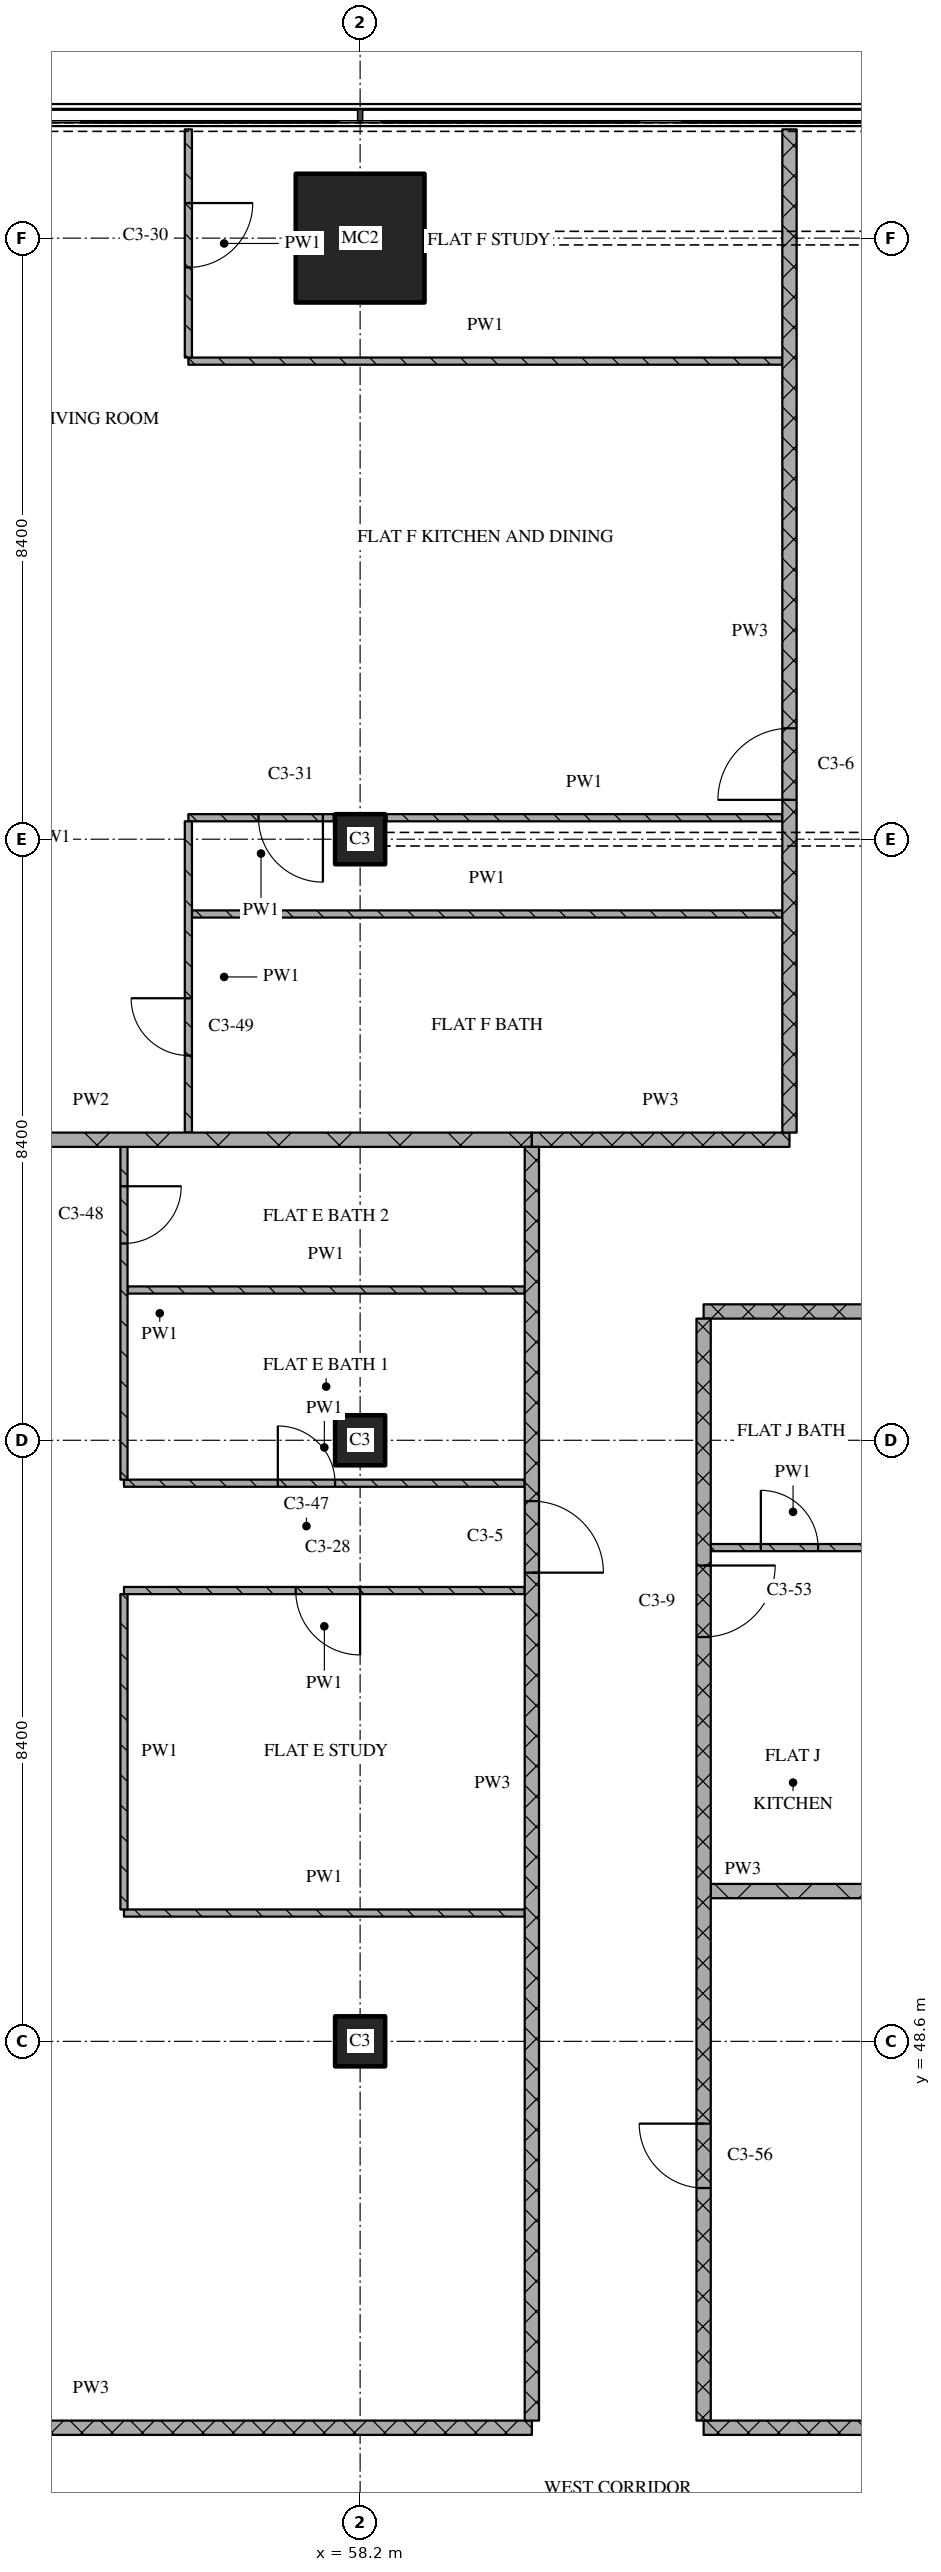
"""IFC4 building model, lengths in metres.
Left out: names, types, materials, properties, quantities, classifications, styles, units other than length and angle.
Written with IfcOpenShell. Run it as: python <this file> out.ifc"""

import sys

from ifc_helpers import new_model, si_unit, direction, frame, frame_2d, origin, origin_2d, place, context, subcontext, project, spatial, rectangle, extrude, element, fill, save


model = new_model("IFC4")
c1 = context("Model", 3, precision=1e-05, world=origin(), true_north=direction((0.0, 1.0)))
c2 = subcontext(c1, "Body", "Model", "MODEL_VIEW")
j1 = project(units=[si_unit("LENGTHUNIT", "METRE"), si_unit("PLANEANGLEUNIT", "RADIAN")], contexts=[c1])
p1 = place(None, origin())
s1 = spatial("IfcSite", under=j1, at=p1, CompositionType="ELEMENT")
p2 = place(p1, origin())
s2 = spatial("IfcBuilding", under=s1, at=p2, CompositionType="ELEMENT")
p3 = place(p2, frame((0.0, 0.0, 176.25)))
s3 = spatial("IfcBuildingStorey", under=s2, at=p3, CompositionType="ELEMENT", Elevation=176.25)
for number, where, z_axis, x_axis in (
    (1, (58.2, 48.6, 0.0), (0.0, 0.0, 1.0), (1.0, 0.0, 0.0)),
    (2, (58.2, 57.0, 0.0), (0.0, 0.0, 1.0), (1.0, 0.0, 0.0)),
    (3, (58.2, 65.4, 0.0), (0.0, 0.0, 1.0), (1.0, 0.0, 0.0)),
):
    element("IfcColumn", number, at=place(p3, frame(where, z_axis=z_axis, x_axis=x_axis)), inside=s3, PredefinedType="COLUMN", context=c2, shape_type="SweptSolid", body=[
        extrude(rectangle(XDim=0.7, YDim=0.7, at=origin_2d()), origin(), (0.0, 0.0, 1.0), 3.6),
    ])
p4 = place(p3, frame((58.2, 73.8, 0.0), z_axis=(0.0, 0.0, 1.0), x_axis=(1.0, 0.0, 0.0)))
e4 = element("IfcColumn", 4, at=p4, inside=s3, PredefinedType="COLUMN", context=c2, shape_type="SweptSolid", body=[
    extrude(rectangle(XDim=1.8, YDim=1.8, at=origin_2d()), origin(), (0.0, 0.0, 1.0), 3.6),
])
p5 = place(p3, frame((48.28, 43.2, 0.0), z_axis=(0.0, 0.0, 1.0), x_axis=(1.0, 0.0, 0.0)))
e5 = element("IfcWall", 5, at=p5, inside=s3, PredefinedType="PARTITIONING", context=c2, shape_type="SweptSolid", body=[
    extrude(rectangle(XDim=12.32, YDim=0.2, at=frame_2d((6.16, 0.0))), origin(), (0.0, 0.0, 1.0), 3.32),
])
p6 = place(p3, frame((63.0, 43.2, 0.0), z_axis=(0.0, 0.0, 1.0), x_axis=(1.0, 0.0, 0.0)))
e6 = element("IfcWall", 6, at=p6, inside=s3, PredefinedType="PARTITIONING", context=c2, shape_type="SweptSolid", body=[
    extrude(rectangle(XDim=5.2, YDim=0.2, at=frame_2d((2.6, 0.0))), origin(), (0.0, 0.0, 1.0), 3.32),
])
p7 = place(p3, frame((54.9, 50.393, 0.0), z_axis=(0.0, 0.0, 1.0), x_axis=(1.0, 0.0, 0.0)))
e7 = element("IfcWall", 7, at=p7, inside=s3, PredefinedType="PARTITIONING", context=c2, shape_type="SweptSolid", body=[
    extrude(rectangle(XDim=5.6, YDim=0.1, at=frame_2d((2.8, 0.0))), origin(), (0.0, 0.0, 1.0), 3.32),
])
p8 = place(p3, frame((63.1, 50.7, 0.0), z_axis=(0.0, 0.0, 1.0), x_axis=(1.0, 0.0, 0.0)))
e8 = element("IfcWall", 8, at=p8, inside=s3, PredefinedType="PARTITIONING", context=c2, shape_type="SweptSolid", body=[
    extrude(rectangle(XDim=5.1, YDim=0.2, at=frame_2d((2.55, 0.0))), origin(), (0.0, 0.0, 1.0), 3.32),
])
p9 = place(p3, frame((60.5, 54.9, 0.0), z_axis=(0.0, 0.0, 1.0), x_axis=(-1.0, 0.0, 0.0)))
e9 = element("IfcWall", 9, at=p9, inside=s3, PredefinedType="PARTITIONING", context=c2, shape_type="SweptSolid", body=[
    extrude(rectangle(XDim=5.6, YDim=0.1, at=frame_2d((2.8, 0.0))), origin(), (0.0, 0.0, 1.0), 3.32),
])
p10 = place(p9, frame((2.3, 0.0, 0.0)))
e10 = element("IfcOpeningElement", 10, at=p10, cuts=e9, PredefinedType="OPENING", context=c2, shape_type="SweptSolid", body=[
    extrude(rectangle(XDim=0.9, YDim=2.1, at=frame_2d((0.45, 1.05))), frame((0.0, 0.06, 0.0), z_axis=(0.0, -1.0, 0.0), x_axis=(1.0, 0.0, 0.0)), (0.0, 0.0, 1.0), 0.12),
])
p11 = place(p3, frame((63.1, 55.5, 0.0), z_axis=(0.0, 0.0, 1.0), x_axis=(1.0, 0.0, 0.0)))
e11 = element("IfcWall", 11, at=p11, inside=s3, PredefinedType="PARTITIONING", context=c2, shape_type="SweptSolid", body=[
    extrude(rectangle(XDim=2.3, YDim=0.1, at=frame_2d((1.15, 0.0))), origin(), (0.0, 0.0, 1.0), 3.32),
])
p12 = place(p11, frame((0.7, 0.0, 0.0)))
e12 = element("IfcOpeningElement", 12, at=p12, cuts=e11, PredefinedType="OPENING", context=c2, shape_type="SweptSolid", body=[
    extrude(rectangle(XDim=0.8, YDim=2.1, at=frame_2d((0.4, 1.05))), frame((0.0, 0.06, 0.0), z_axis=(0.0, -1.0, 0.0), x_axis=(1.0, 0.0, 0.0)), (0.0, 0.0, 1.0), 0.12),
])
p13 = place(p3, frame((54.9, 56.4, 0.0), z_axis=(0.0, 0.0, 1.0), x_axis=(1.0, 0.0, 0.0)))
e13 = element("IfcWall", 13, at=p13, inside=s3, PredefinedType="PARTITIONING", context=c2, shape_type="SweptSolid", body=[
    extrude(rectangle(XDim=5.6, YDim=0.1, at=frame_2d((2.8, 0.0))), origin(), (0.0, 0.0, 1.0), 3.32),
])
p14 = place(p13, frame((2.15, 0.0, 0.0)))
e14 = element("IfcOpeningElement", 14, at=p14, cuts=e13, PredefinedType="OPENING", context=c2, shape_type="SweptSolid", body=[
    extrude(rectangle(XDim=0.8, YDim=2.1, at=frame_2d((0.4, 1.05))), frame((0.0, 0.06, 0.0), z_axis=(0.0, -1.0, 0.0), x_axis=(1.0, 0.0, 0.0)), (0.0, 0.0, 1.0), 0.12),
])
p15 = place(p3, frame((63.0, 58.8, 0.0), z_axis=(0.0, 0.0, 1.0), x_axis=(1.0, 0.0, 0.0)))
e15 = element("IfcWall", 15, at=p15, inside=s3, PredefinedType="PARTITIONING", context=c2, shape_type="SweptSolid", body=[
    extrude(rectangle(XDim=10.8, YDim=0.2, at=frame_2d((5.4, 0.0))), origin(), (0.0, 0.0, 1.0), 3.32),
])
p16 = place(p3, frame((54.95, 59.1, 0.0), z_axis=(0.0, 0.0, 1.0), x_axis=(1.0, 0.0, 0.0)))
e16 = element("IfcWall", 16, at=p16, inside=s3, PredefinedType="PARTITIONING", context=c2, shape_type="SweptSolid", body=[
    extrude(rectangle(XDim=5.55, YDim=0.1, at=frame_2d((2.775, 0.0))), origin(), (0.0, 0.0, 1.0), 3.32),
])
p17 = place(p3, frame((60.6, 61.2, 0.0), z_axis=(0.0, 0.0, 1.0), x_axis=(1.0, 0.0, 0.0)))
e17 = element("IfcWall", 17, at=p17, inside=s3, PredefinedType="PARTITIONING", context=c2, shape_type="SweptSolid", body=[
    extrude(rectangle(XDim=3.6, YDim=0.2, at=frame_2d((1.8, 0.0))), origin(), (0.0, 0.0, 1.0), 3.32),
])
p18 = place(p3, frame((48.28, 61.2, 0.0), z_axis=(0.0, 0.0, 1.0), x_axis=(1.0, 0.0, 0.0)))
e18 = element("IfcWall", 18, at=p18, inside=s3, PredefinedType="PARTITIONING", context=c2, shape_type="SweptSolid", body=[
    extrude(rectangle(XDim=12.32, YDim=0.2, at=frame_2d((6.16, 0.0))), origin(), (0.0, 0.0, 1.0), 3.32),
])
p19 = place(p3, frame((55.85, 64.355, 0.0), z_axis=(0.0, 0.0, 1.0), x_axis=(1.0, 0.0, 0.0)))
e19 = element("IfcWall", 19, at=p19, inside=s3, PredefinedType="PARTITIONING", context=c2, shape_type="SweptSolid", body=[
    extrude(rectangle(XDim=8.25, YDim=0.1, at=frame_2d((4.125, 0.0))), origin(), (0.0, 0.0, 1.0), 3.32),
])
p20 = place(p3, frame((57.83, 65.7, 0.0), z_axis=(0.0, 0.0, 1.0), x_axis=(-1.0, 0.0, 0.0)))
e20 = element("IfcWall", 20, at=p20, inside=s3, PredefinedType="PARTITIONING", context=c2, shape_type="SweptSolid", body=[
    extrude(rectangle(XDim=2.03, YDim=0.1, at=frame_2d((1.015, 0.0))), origin(), (0.0, 0.0, 1.0), 3.32),
])
p21 = place(p20, frame((0.15, 0.0, 0.0)))
e21 = element("IfcOpeningElement", 21, at=p21, cuts=e20, PredefinedType="OPENING", context=c2, shape_type="SweptSolid", body=[
    extrude(rectangle(XDim=0.9, YDim=2.1, at=frame_2d((0.45, 1.05))), frame((0.0, 0.06, 0.0), z_axis=(0.0, -1.0, 0.0), x_axis=(1.0, 0.0, 0.0)), (0.0, 0.0, 1.0), 0.12),
])
p22 = place(p3, frame((58.57, 65.7, 0.0), z_axis=(0.0, 0.0, 1.0), x_axis=(1.0, 0.0, 0.0)))
e22 = element("IfcWall", 22, at=p22, inside=s3, PredefinedType="PARTITIONING", context=c2, shape_type="SweptSolid", body=[
    extrude(rectangle(XDim=5.53, YDim=0.1, at=frame_2d((2.765, 0.0))), origin(), (0.0, 0.0, 1.0), 3.32),
])
p23 = place(p3, frame((55.8, 72.081, 0.0), z_axis=(0.0, 0.0, 1.0), x_axis=(1.0, 0.0, 0.0)))
e23 = element("IfcWall", 23, at=p23, inside=s3, PredefinedType="PARTITIONING", context=c2, shape_type="SweptSolid", body=[
    extrude(rectangle(XDim=8.3, YDim=0.1, at=frame_2d((4.15, 0.0))), origin(), (0.0, 0.0, 1.0), 3.32),
])
p24 = place(p3, frame((54.9, 54.85, 0.0), z_axis=(0.0, 0.0, 1.0), x_axis=(0.0, -1.0, 0.0)))
e24 = element("IfcWall", 24, at=p24, inside=s3, PredefinedType="PARTITIONING", context=c2, shape_type="SweptSolid", body=[
    extrude(rectangle(XDim=4.407, YDim=0.1, at=frame_2d((2.204, 0.0))), origin(), (0.0, 0.0, 1.0), 3.32),
])
p25 = place(p3, frame((54.9, 61.1, 0.0), z_axis=(0.0, 0.0, 1.0), x_axis=(0.0, -1.0, 0.0)))
e25 = element("IfcWall", 25, at=p25, inside=s3, PredefinedType="PARTITIONING", context=c2, shape_type="SweptSolid", body=[
    extrude(rectangle(XDim=4.65, YDim=0.1, at=frame_2d((2.325, 0.0))), origin(), (0.0, 0.0, 1.0), 3.32),
])
p26 = place(p25, frame((0.55, 0.0, 0.0)))
e26 = element("IfcOpeningElement", 26, at=p26, cuts=e25, PredefinedType="OPENING", context=c2, shape_type="SweptSolid", body=[
    extrude(rectangle(XDim=0.8, YDim=2.1, at=frame_2d((0.4, 1.05))), frame((0.0, 0.06, 0.0), z_axis=(0.0, -1.0, 0.0), x_axis=(1.0, 0.0, 0.0)), (0.0, 0.0, 1.0), 0.12),
])
p27 = place(p3, frame((55.8, 65.65, 0.0), z_axis=(0.0, 0.0, 1.0), x_axis=(0.0, -1.0, 0.0)))
e27 = element("IfcWall", 27, at=p27, inside=s3, PredefinedType="PARTITIONING", context=c2, shape_type="SweptSolid", body=[
    extrude(rectangle(XDim=4.35, YDim=0.1, at=frame_2d((2.175, 0.0))), origin(), (0.0, 0.0, 1.0), 3.32),
])
p28 = place(p27, frame((2.473, 0.0, 0.0)))
e28 = element("IfcOpeningElement", 28, at=p28, cuts=e27, PredefinedType="OPENING", context=c2, shape_type="SweptSolid", body=[
    extrude(rectangle(XDim=0.8, YDim=2.1, at=frame_2d((0.4, 1.05))), frame((0.0, 0.06, 0.0), z_axis=(0.0, -1.0, 0.0), x_axis=(1.0, 0.0, 0.0)), (0.0, 0.0, 1.0), 0.12),
])
p29 = place(p3, frame((55.8, 75.32, 0.0), z_axis=(0.0, 0.0, 1.0), x_axis=(0.0, -1.0, 0.0)))
e29 = element("IfcWall", 29, at=p29, inside=s3, PredefinedType="PARTITIONING", context=c2, shape_type="SweptSolid", body=[
    extrude(rectangle(XDim=3.189, YDim=0.1, at=frame_2d((1.594, 0.0))), origin(), (0.0, 0.0, 1.0), 3.32),
])
p30 = place(p29, frame((1.03, 0.0, 0.0)))
e30 = element("IfcOpeningElement", 30, at=p30, cuts=e29, PredefinedType="OPENING", context=c2, shape_type="SweptSolid", body=[
    extrude(rectangle(XDim=0.9, YDim=2.1, at=frame_2d((0.45, 1.05))), frame((0.0, 0.06, 0.0), z_axis=(0.0, -1.0, 0.0), x_axis=(1.0, 0.0, 0.0)), (0.0, 0.0, 1.0), 0.12),
])
p31 = place(p3, frame((60.6, 43.3, 0.0), z_axis=(0.0, 0.0, 1.0), x_axis=(0.0, 1.0, 0.0)))
e31 = element("IfcWall", 31, at=p31, inside=s3, PredefinedType="PARTITIONING", context=c2, shape_type="SweptSolid", body=[
    extrude(rectangle(XDim=17.8, YDim=0.2, at=frame_2d((8.9, 0.0))), origin(), (0.0, 0.0, 1.0), 3.32),
])
p32 = place(p31, frame((11.85, 0.0, 0.0)))
e32 = element("IfcOpeningElement", 32, at=p32, cuts=e31, PredefinedType="OPENING", context=c2, shape_type="SweptSolid", body=[
    extrude(rectangle(XDim=1.0, YDim=2.1, at=frame_2d((0.5, 1.05))), frame((0.0, 0.11, 0.0), z_axis=(0.0, -1.0, 0.0), x_axis=(1.0, 0.0, 0.0)), (0.0, 0.0, 1.0), 0.22),
])
p33 = place(p3, frame((63.0, 58.7, 0.0), z_axis=(0.0, 0.0, 1.0), x_axis=(0.0, -1.0, 0.0)))
e33 = element("IfcWall", 33, at=p33, inside=s3, PredefinedType="PARTITIONING", context=c2, shape_type="SweptSolid", body=[
    extrude(rectangle(XDim=15.4, YDim=0.2, at=frame_2d((7.7, 0.0))), origin(), (0.0, 0.0, 1.0), 3.32),
])
p34 = place(p33, frame((3.45, 0.0, 0.0)))
e34 = element("IfcOpeningElement", 34, at=p34, cuts=e33, PredefinedType="OPENING", context=c2, shape_type="SweptSolid", body=[
    extrude(rectangle(XDim=1.0, YDim=2.1, at=frame_2d((0.5, 1.05))), frame((0.0, 0.11, 0.0), z_axis=(0.0, -1.0, 0.0), x_axis=(1.0, 0.0, 0.0)), (0.0, 0.0, 1.0), 0.22),
])
p35 = place(p33, frame((11.25, 0.0, 0.0)))
e35 = element("IfcOpeningElement", 35, at=p35, cuts=e33, PredefinedType="OPENING", context=c2, shape_type="SweptSolid", body=[
    extrude(rectangle(XDim=0.9, YDim=2.1, at=frame_2d((0.45, 1.05))), frame((0.0, 0.11, 0.0), z_axis=(0.0, -1.0, 0.0), x_axis=(1.0, 0.0, 0.0)), (0.0, 0.0, 1.0), 0.22),
])
p36 = place(p3, frame((64.2, 61.3, 0.0), z_axis=(0.0, 0.0, 1.0), x_axis=(0.0, 1.0, 0.0)))
e36 = element("IfcWall", 36, at=p36, inside=s3, PredefinedType="PARTITIONING", context=c2, shape_type="SweptSolid", body=[
    extrude(rectangle(XDim=14.02, YDim=0.2, at=frame_2d((7.01, 0.0))), origin(), (0.0, 0.0, 1.0), 3.32),
])
p37 = place(p36, frame((4.65, 0.0, 0.0)))
e37 = element("IfcOpeningElement", 37, at=p37, cuts=e36, PredefinedType="OPENING", context=c2, shape_type="SweptSolid", body=[
    extrude(rectangle(XDim=1.0, YDim=2.1, at=frame_2d((0.5, 1.05))), frame((0.0, 0.11, 0.0), z_axis=(0.0, -1.0, 0.0), x_axis=(1.0, 0.0, 0.0)), (0.0, 0.0, 1.0), 0.22),
])
p38 = place(p10, origin())
e38 = element("IfcDoor", 38, at=p38, inside=s3, OperationType="SINGLE_SWING_LEFT", PredefinedType="DOOR", context=c2, shape_type="SweptSolid", body=[
    extrude(rectangle(XDim=0.9, YDim=2.1, at=frame_2d((0.45, 1.05))), frame((0.0, 0.025, 0.0), z_axis=(0.0, -1.0, 0.0), x_axis=(1.0, 0.0, 0.0)), (0.0, 0.0, 1.0), 0.05),
])
fill(e10, e38)
p39 = place(p12, origin())
e39 = element("IfcDoor", 39, at=p39, inside=s3, OperationType="SINGLE_SWING_LEFT", PredefinedType="DOOR", context=c2, shape_type="SweptSolid", body=[
    extrude(rectangle(XDim=0.8, YDim=2.1, at=frame_2d((0.4, 1.05))), frame((0.0, 0.025, 0.0), z_axis=(0.0, -1.0, 0.0), x_axis=(1.0, 0.0, 0.0)), (0.0, 0.0, 1.0), 0.05),
])
fill(e12, e39)
p40 = place(p14, origin())
e40 = element("IfcDoor", 40, at=p40, inside=s3, OperationType="SINGLE_SWING_LEFT", PredefinedType="DOOR", context=c2, shape_type="SweptSolid", body=[
    extrude(rectangle(XDim=0.8, YDim=2.1, at=frame_2d((0.4, 1.05))), frame((0.0, 0.025, 0.0), z_axis=(0.0, -1.0, 0.0), x_axis=(1.0, 0.0, 0.0)), (0.0, 0.0, 1.0), 0.05),
])
fill(e14, e40)
p41 = place(p21, origin())
e41 = element("IfcDoor", 41, at=p41, inside=s3, OperationType="SINGLE_SWING_LEFT", PredefinedType="DOOR", context=c2, shape_type="SweptSolid", body=[
    extrude(rectangle(XDim=0.9, YDim=2.1, at=frame_2d((0.45, 1.05))), frame((0.0, 0.025, 0.0), z_axis=(0.0, -1.0, 0.0), x_axis=(1.0, 0.0, 0.0)), (0.0, 0.0, 1.0), 0.05),
])
fill(e21, e41)
p42 = place(p26, origin())
e42 = element("IfcDoor", 42, at=p42, inside=s3, OperationType="SINGLE_SWING_LEFT", PredefinedType="DOOR", context=c2, shape_type="SweptSolid", body=[
    extrude(rectangle(XDim=0.8, YDim=2.1, at=frame_2d((0.4, 1.05))), frame((0.0, 0.025, 0.0), z_axis=(0.0, -1.0, 0.0), x_axis=(1.0, 0.0, 0.0)), (0.0, 0.0, 1.0), 0.05),
])
fill(e26, e42)
p43 = place(p28, origin())
e43 = element("IfcDoor", 43, at=p43, inside=s3, OperationType="SINGLE_SWING_RIGHT", PredefinedType="DOOR", context=c2, shape_type="SweptSolid", body=[
    extrude(rectangle(XDim=0.8, YDim=2.1, at=frame_2d((0.4, 1.05))), frame((0.0, 0.025, 0.0), z_axis=(0.0, -1.0, 0.0), x_axis=(1.0, 0.0, 0.0)), (0.0, 0.0, 1.0), 0.05),
])
fill(e28, e43)
p44 = place(p30, origin())
e44 = element("IfcDoor", 44, at=p44, inside=s3, OperationType="SINGLE_SWING_LEFT", PredefinedType="DOOR", context=c2, shape_type="SweptSolid", body=[
    extrude(rectangle(XDim=0.9, YDim=2.1, at=frame_2d((0.45, 1.05))), frame((0.0, 0.025, 0.0), z_axis=(0.0, -1.0, 0.0), x_axis=(1.0, 0.0, 0.0)), (0.0, 0.0, 1.0), 0.05),
])
fill(e30, e44)
p45 = place(p32, origin())
e45 = element("IfcDoor", 45, at=p45, inside=s3, OperationType="SINGLE_SWING_RIGHT", PredefinedType="DOOR", context=c2, shape_type="SweptSolid", body=[
    extrude(rectangle(XDim=1.0, YDim=2.1, at=frame_2d((0.5, 1.05))), frame((0.0, 0.025, 0.0), z_axis=(0.0, -1.0, 0.0), x_axis=(1.0, 0.0, 0.0)), (0.0, 0.0, 1.0), 0.05),
])
fill(e32, e45)
p46 = place(p34, origin())
e46 = element("IfcDoor", 46, at=p46, inside=s3, OperationType="SINGLE_SWING_LEFT", PredefinedType="DOOR", context=c2, shape_type="SweptSolid", body=[
    extrude(rectangle(XDim=1.0, YDim=2.1, at=frame_2d((0.5, 1.05))), frame((0.0, 0.025, 0.0), z_axis=(0.0, -1.0, 0.0), x_axis=(1.0, 0.0, 0.0)), (0.0, 0.0, 1.0), 0.05),
])
fill(e34, e46)
p47 = place(p35, origin())
e47 = element("IfcDoor", 47, at=p47, inside=s3, OperationType="SINGLE_SWING_RIGHT", PredefinedType="DOOR", context=c2, shape_type="SweptSolid", body=[
    extrude(rectangle(XDim=0.9, YDim=2.1, at=frame_2d((0.45, 1.05))), frame((0.0, 0.025, 0.0), z_axis=(0.0, -1.0, 0.0), x_axis=(1.0, 0.0, 0.0)), (0.0, 0.0, 1.0), 0.05),
])
fill(e35, e47)
p48 = place(p37, origin())
e48 = element("IfcDoor", 48, at=p48, inside=s3, OperationType="SINGLE_SWING_LEFT", PredefinedType="DOOR", context=c2, shape_type="SweptSolid", body=[
    extrude(rectangle(XDim=1.0, YDim=2.1, at=frame_2d((0.5, 1.05))), frame((0.0, 0.025, 0.0), z_axis=(0.0, -1.0, 0.0), x_axis=(1.0, 0.0, 0.0)), (0.0, 0.0, 1.0), 0.05),
])
fill(e37, e48)
save(model, sys.argv[1])
